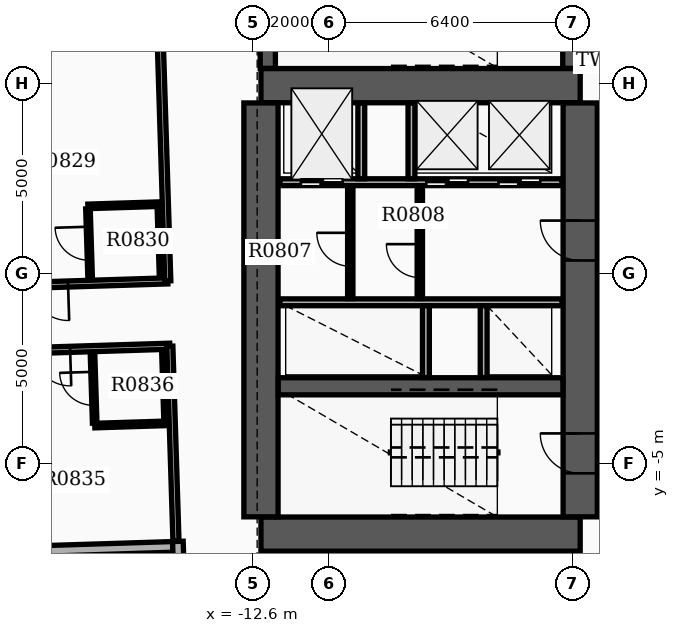
"""IFC4 building model, lengths in metres.
Left out: names, types, materials, properties, quantities, classifications, styles, units other than length and angle.
Written with IfcOpenShell. Run it as: python <this file> out.ifc"""

import sys

from ifc_helpers import new_model, si_unit, direction, frame, frame_2d, origin, place, context, subcontext, project, spatial, rectangle, extrude, element, fill, save


model = new_model("IFC4")
c1 = context("Model", 3, precision=1e-05, world=origin(), true_north=direction((0.0, 1.0)))
c2 = subcontext(c1, "Body", "Model", "MODEL_VIEW")
j1 = project(units=[si_unit("LENGTHUNIT", "METRE"), si_unit("PLANEANGLEUNIT", "RADIAN")], contexts=[c1])
p1 = place(None, origin())
s1 = spatial("IfcSite", under=j1, at=p1, CompositionType="ELEMENT")
p2 = place(p1, origin())
s2 = spatial("IfcBuilding", under=s1, at=p2, CompositionType="ELEMENT")
p3 = place(p2, frame((0.0, 0.0, 56.1)))
s3 = spatial("IfcBuildingStorey", under=s2, at=p3, CompositionType="ELEMENT", Elevation=56.1)
for number, where, z_axis, x_axis in (
    (1, (-12.4, -6.85, 0.0), (0.0, 0.0, 1.0), (1.0, 0.0, 0.0)),
    (2, (-12.4, 4.95, 0.0), (0.0, 0.0, 1.0), (1.0, 0.0, 0.0)),
):
    element("IfcWall", number, at=place(p3, frame(where, z_axis=z_axis, x_axis=x_axis)), inside=s3, PredefinedType="SHEAR", context=c2, shape_type="SweptSolid", body=[
        extrude(rectangle(XDim=8.4, YDim=0.9, at=frame_2d((4.2, 0.0))), origin(), (0.0, 0.0, 1.0), 3.7),
    ])
p4 = place(p3, frame((-12.4, -6.395, 0.0), z_axis=(0.0, 0.0, 1.0), x_axis=(0.0, 1.0, 0.0)))
e3 = element("IfcWall", 3, at=p4, inside=s3, PredefinedType="SHEAR", context=c2, shape_type="SweptSolid", body=[
    extrude(rectangle(XDim=10.89, YDim=0.9, at=frame_2d((5.445, 0.0))), origin(), (0.0, 0.0, 1.0), 3.7),
])
p5 = place(p3, frame((-4.0, -6.395, 0.0), z_axis=(0.0, 0.0, 1.0), x_axis=(0.0, 1.0, 0.0)))
e4 = element("IfcWall", 4, at=p5, inside=s3, PredefinedType="SHEAR", context=c2, shape_type="SweptSolid", body=[
    extrude(rectangle(XDim=10.89, YDim=0.9, at=frame_2d((5.445, 0.0))), origin(), (0.0, 0.0, 1.0), 3.7),
])
p6 = place(p5, frame((1.145, 0.0, 0.0)))
e5 = element("IfcOpeningElement", 5, at=p6, cuts=e4, PredefinedType="OPENING", context=c2, shape_type="SweptSolid", body=[
    extrude(rectangle(XDim=1.05, YDim=2.15, at=frame_2d((0.525, 1.075))), frame((0.0, 0.46, 0.0), z_axis=(0.0, -1.0, 0.0), x_axis=(1.0, 0.0, 0.0)), (0.0, 0.0, 1.0), 0.92),
])
p7 = place(p5, frame((6.745, 0.0, 0.0)))
e6 = element("IfcOpeningElement", 6, at=p7, cuts=e4, PredefinedType="OPENING", context=c2, shape_type="SweptSolid", body=[
    extrude(rectangle(XDim=1.05, YDim=2.15, at=frame_2d((0.525, 1.075))), frame((0.0, 0.46, 0.0), z_axis=(0.0, -1.0, 0.0), x_axis=(1.0, 0.0, 0.0)), (0.0, 0.0, 1.0), 0.92),
])
p8 = place(p3, frame((-11.945, -2.96, 0.0), z_axis=(0.0, 0.0, 1.0), x_axis=(1.0, 0.0, 0.0)))
e7 = element("IfcWall", 7, at=p8, inside=s3, PredefinedType="SHEAR", context=c2, shape_type="SweptSolid", body=[
    extrude(rectangle(XDim=7.49, YDim=0.45, at=frame_2d((3.745, 0.0))), origin(), (0.0, 0.0, 1.0), 3.7),
])
p9 = place(p3, frame((-12.22, 5.405, 0.0), z_axis=(0.0, 0.0, 1.0), x_axis=(0.0, 1.0, 0.0)))
e8 = element("IfcWall", 8, at=p9, inside=s3, PredefinedType="SHEAR", context=c2, shape_type="SweptSolid", body=[
    extrude(rectangle(XDim=3.43, YDim=0.4, at=frame_2d((1.715, 0.0))), origin(), (0.0, 0.0, 1.0), 3.7),
])
p10 = place(p3, frame((-4.26, 5.405, 0.0), z_axis=(0.0, 0.0, 1.0), x_axis=(0.0, 1.0, 0.0)))
e9 = element("IfcWall", 9, at=p10, inside=s3, PredefinedType="SHEAR", context=c2, shape_type="SweptSolid", body=[
    extrude(rectangle(XDim=3.43, YDim=0.4, at=frame_2d((1.715, 0.0))), origin(), (0.0, 0.0, 1.0), 3.7),
])
p11 = place(p10, frame((1.195, 0.0, 0.0)))
e10 = element("IfcOpeningElement", 10, at=p11, cuts=e9, PredefinedType="OPENING", context=c2, shape_type="SweptSolid", body=[
    extrude(rectangle(XDim=1.05, YDim=2.15, at=frame_2d((0.525, 1.075))), frame((0.0, 0.21, 0.0), z_axis=(0.0, -1.0, 0.0), x_axis=(1.0, 0.0, 0.0)), (0.0, 0.0, 1.0), 0.42),
])
p12 = place(p3, frame((-15.144, 6.247, 0.0), z_axis=(0.0, 0.0, 1.0), x_axis=(-0.999506955354, -0.031398187845, 0.0)))
e11 = element("IfcWall", 11, at=p12, inside=s3, PredefinedType="STANDARD", context=c2, shape_type="SweptSolid", body=[
    extrude(rectangle(XDim=20.1, YDim=0.28, at=frame_2d((10.05, 0.0))), origin(), (0.0, 0.0, 1.0), 2.91),
])
p13 = place(p12, frame((0.85, 0.0, 0.8)))
e12 = element("IfcOpeningElement", 12, at=p13, cuts=e11, PredefinedType="OPENING", context=c2, shape_type="SweptSolid", body=[
    extrude(rectangle(XDim=1.4, YDim=1.6, at=frame_2d((0.7, 0.8))), frame((0.0, 0.15, 0.0), z_axis=(0.0, -1.0, 0.0), x_axis=(1.0, 0.0, 0.0)), (0.0, 0.0, 1.0), 0.3),
])
p14 = place(p12, frame((4.05, 0.0, 0.8)))
e13 = element("IfcOpeningElement", 13, at=p14, cuts=e11, PredefinedType="OPENING", context=c2, shape_type="SweptSolid", body=[
    extrude(rectangle(XDim=1.4, YDim=1.6, at=frame_2d((0.7, 0.8))), frame((0.0, 0.15, 0.0), z_axis=(0.0, -1.0, 0.0), x_axis=(1.0, 0.0, 0.0)), (0.0, 0.0, 1.0), 0.3),
])
p15 = place(p12, frame((7.25, 0.0, 0.8)))
e14 = element("IfcOpeningElement", 14, at=p15, cuts=e11, PredefinedType="OPENING", context=c2, shape_type="SweptSolid", body=[
    extrude(rectangle(XDim=1.4, YDim=1.6, at=frame_2d((0.7, 0.8))), frame((0.0, 0.15, 0.0), z_axis=(0.0, -1.0, 0.0), x_axis=(1.0, 0.0, 0.0)), (0.0, 0.0, 1.0), 0.3),
])
p16 = place(p12, frame((10.45, 0.0, 0.8)))
e15 = element("IfcOpeningElement", 15, at=p16, cuts=e11, PredefinedType="OPENING", context=c2, shape_type="SweptSolid", body=[
    extrude(rectangle(XDim=1.4, YDim=1.6, at=frame_2d((0.7, 0.8))), frame((0.0, 0.15, 0.0), z_axis=(0.0, -1.0, 0.0), x_axis=(1.0, 0.0, 0.0)), (0.0, 0.0, 1.0), 0.3),
])
p17 = place(p3, frame((-34.812, -7.817, 0.0), z_axis=(0.0, 0.0, 1.0), x_axis=(0.999506574096, 0.031410322165, 0.0)))
e16 = element("IfcWall", 16, at=p17, inside=s3, PredefinedType="STANDARD", context=c2, shape_type="SweptSolid", body=[
    extrude(rectangle(XDim=20.1, YDim=0.28, at=frame_2d((10.05, 0.0))), origin(), (0.0, 0.0, 1.0), 2.91),
])
p18 = place(p17, frame((0.85, 0.0, 0.8)))
e17 = element("IfcOpeningElement", 17, at=p18, cuts=e16, PredefinedType="OPENING", context=c2, shape_type="SweptSolid", body=[
    extrude(rectangle(XDim=1.4, YDim=1.6, at=frame_2d((0.7, 0.8))), frame((0.0, 0.15, 0.0), z_axis=(0.0, -1.0, 0.0), x_axis=(1.0, 0.0, 0.0)), (0.0, 0.0, 1.0), 0.3),
])
p19 = place(p17, frame((4.05, 0.0, 0.8)))
e18 = element("IfcOpeningElement", 18, at=p19, cuts=e16, PredefinedType="OPENING", context=c2, shape_type="SweptSolid", body=[
    extrude(rectangle(XDim=1.4, YDim=1.6, at=frame_2d((0.7, 0.8))), frame((0.0, 0.15, 0.0), z_axis=(0.0, -1.0, 0.0), x_axis=(1.0, 0.0, 0.0)), (0.0, 0.0, 1.0), 0.3),
])
p20 = place(p17, frame((7.25, 0.0, 0.8)))
e19 = element("IfcOpeningElement", 19, at=p20, cuts=e16, PredefinedType="OPENING", context=c2, shape_type="SweptSolid", body=[
    extrude(rectangle(XDim=1.4, YDim=1.6, at=frame_2d((0.7, 0.8))), frame((0.0, 0.15, 0.0), z_axis=(0.0, -1.0, 0.0), x_axis=(1.0, 0.0, 0.0)), (0.0, 0.0, 1.0), 0.3),
])
p21 = place(p17, frame((10.45, 0.0, 0.8)))
e20 = element("IfcOpeningElement", 20, at=p21, cuts=e16, PredefinedType="OPENING", context=c2, shape_type="SweptSolid", body=[
    extrude(rectangle(XDim=1.4, YDim=1.6, at=frame_2d((0.7, 0.8))), frame((0.0, 0.15, 0.0), z_axis=(0.0, -1.0, 0.0), x_axis=(1.0, 0.0, 0.0)), (0.0, 0.0, 1.0), 0.3),
])
p22 = place(p17, frame((15.0, 0.0, 0.0)))
e21 = element("IfcOpeningElement", 21, at=p22, cuts=e16, PredefinedType="OPENING", context=c2, shape_type="SweptSolid", body=[
    extrude(rectangle(XDim=0.96, YDim=2.1, at=frame_2d((0.48, 1.05))), frame((0.0, 0.15, 0.0), z_axis=(0.0, -1.0, 0.0), x_axis=(1.0, 0.0, 0.0)), (0.0, 0.0, 1.0), 0.3),
])
p23 = place(p3, frame((-14.586, -7.042, 0.0), z_axis=(0.0, 0.0, 1.0), x_axis=(0.031389189386, -0.999507237988, 0.0)))
e22 = element("IfcWall", 22, at=p23, inside=s3, PredefinedType="STANDARD", context=c2, shape_type="SweptSolid", body=[
    extrude(rectangle(XDim=6.86, YDim=0.28, at=frame_2d((3.43, 0.0))), origin(), (0.0, 0.0, 1.0), 2.91),
])
p24 = place(p3, frame((-11.9, 2.41, 0.0), z_axis=(0.0, 0.0, 1.0), x_axis=(1.0, 0.0, 0.0)))
e23 = element("IfcWall", 23, at=p24, inside=s3, PredefinedType="SOLIDWALL", context=c2, shape_type="SweptSolid", body=[
    extrude(rectangle(XDim=7.42, YDim=0.18, at=frame_2d((3.71, 0.0))), origin(), (0.0, 0.0, 1.0), 2.9),
])
p25 = place(p24, frame((0.55, 0.0, 0.0)))
e24 = element("IfcOpeningElement", 24, at=p25, cuts=e23, PredefinedType="OPENING", context=c2, shape_type="SweptSolid", body=[
    extrude(rectangle(XDim=1.1, YDim=2.15, at=frame_2d((0.55, 1.075))), frame((0.0, 0.1, 0.0), z_axis=(0.0, -1.0, 0.0), x_axis=(1.0, 0.0, 0.0)), (0.0, 0.0, 1.0), 0.2),
])
p26 = place(p24, frame((3.85, 0.0, 0.0)))
e25 = element("IfcOpeningElement", 25, at=p26, cuts=e23, PredefinedType="OPENING", context=c2, shape_type="SweptSolid", body=[
    extrude(rectangle(XDim=1.1, YDim=2.15, at=frame_2d((0.55, 1.075))), frame((0.0, 0.1, 0.0), z_axis=(0.0, -1.0, 0.0), x_axis=(1.0, 0.0, 0.0)), (0.0, 0.0, 1.0), 0.2),
])
p27 = place(p24, frame((5.75, 0.0, 0.0)))
e26 = element("IfcOpeningElement", 26, at=p27, cuts=e23, PredefinedType="OPENING", context=c2, shape_type="SweptSolid", body=[
    extrude(rectangle(XDim=1.1, YDim=2.15, at=frame_2d((0.55, 1.075))), frame((0.0, 0.1, 0.0), z_axis=(0.0, -1.0, 0.0), x_axis=(1.0, 0.0, 0.0)), (0.0, 0.0, 1.0), 0.2),
])
p28 = place(p3, frame((-11.9, -0.75, 0.0), z_axis=(0.0, 0.0, 1.0), x_axis=(1.0, 0.0, 0.0)))
e27 = element("IfcWall", 27, at=p28, inside=s3, PredefinedType="SOLIDWALL", context=c2, shape_type="SweptSolid", body=[
    extrude(rectangle(XDim=7.42, YDim=0.18, at=frame_2d((3.71, 0.0))), origin(), (0.0, 0.0, 1.0), 2.9),
])
for number, where, z_axis, x_axis in (
    (28, (-9.76, 2.5, 0.0), (0.0, 0.0, 1.0), (0.0, 1.0, 0.0)),
    (29, (-8.44, 2.5, 0.0), (0.0, 0.0, 1.0), (0.0, 1.0, 0.0)),
):
    element("IfcWall", number, at=place(p3, frame(where, z_axis=z_axis, x_axis=x_axis)), inside=s3, PredefinedType="SOLIDWALL", context=c2, shape_type="SweptSolid", body=[
        extrude(rectangle(XDim=1.99, YDim=0.18, at=frame_2d((0.995, 0.0))), origin(), (0.0, 0.0, 1.0), 2.9),
    ])
for number, where, z_axis, x_axis in (
    (30, (-8.06, -2.73, 0.0), (0.0, 0.0, 1.0), (0.0, 1.0, 0.0)),
    (31, (-6.54, -2.73, 0.0), (0.0, 0.0, 1.0), (0.0, 1.0, 0.0)),
):
    element("IfcWall", number, at=place(p3, frame(where, z_axis=z_axis, x_axis=x_axis)), inside=s3, PredefinedType="SOLIDWALL", context=c2, shape_type="SweptSolid", body=[
        extrude(rectangle(XDim=1.89, YDim=0.18, at=frame_2d((0.945, 0.0))), origin(), (0.0, 0.0, 1.0), 2.9),
    ])
p29 = place(p3, frame((-8.22, -0.65, 0.0), z_axis=(0.0, 0.0, 1.0), x_axis=(0.0, 1.0, 0.0)))
e32 = element("IfcWall", 32, at=p29, inside=s3, PredefinedType="SOLIDWALL", context=c2, shape_type="SweptSolid", body=[
    extrude(rectangle(XDim=2.96, YDim=0.14, at=frame_2d((1.48, 0.0))), origin(), (0.0, 0.0, 1.0), 2.9),
])
p30 = place(p29, frame((0.55, 0.0, 0.0)))
e33 = element("IfcOpeningElement", 33, at=p30, cuts=e32, PredefinedType="OPENING", context=c2, shape_type="SweptSolid", body=[
    extrude(rectangle(XDim=0.88, YDim=2.1, at=frame_2d((0.44, 1.05))), frame((0.0, 0.08, 0.0), z_axis=(0.0, -1.0, 0.0), x_axis=(1.0, 0.0, 0.0)), (0.0, 0.0, 1.0), 0.16),
])
p31 = place(p3, frame((-10.05, -0.652, 0.0), z_axis=(0.0, 0.0, 1.0), x_axis=(0.0, 1.0, 0.0)))
e34 = element("IfcWall", 34, at=p31, inside=s3, PredefinedType="PARTITIONING", context=c2, shape_type="SweptSolid", body=[
    extrude(rectangle(XDim=2.962, YDim=0.14, at=frame_2d((1.481, 0.0))), origin(), (0.0, 0.0, 1.0), 2.9),
])
p32 = place(p31, frame((0.85, 0.0, 0.0)))
e35 = element("IfcOpeningElement", 35, at=p32, cuts=e34, PredefinedType="OPENING", context=c2, shape_type="SweptSolid", body=[
    extrude(rectangle(XDim=0.88, YDim=2.1, at=frame_2d((0.44, 1.05))), frame((0.0, 0.08, 0.0), z_axis=(0.0, -1.0, 0.0), x_axis=(1.0, 0.0, 0.0)), (0.0, 0.0, 1.0), 0.16),
])
p33 = place(p3, frame((-14.852, -0.187, 0.0), z_axis=(0.0, 0.0, 1.0), x_axis=(-0.99950639469, -0.031416030536, 0.0)))
e36 = element("IfcWall", 36, at=p33, inside=s3, PredefinedType="PARTITIONING", context=c2, shape_type="SweptSolid", body=[
    extrude(rectangle(XDim=20.182, YDim=0.16, at=frame_2d((10.091, 0.0))), origin(), (0.0, 0.0, 1.0), 2.9),
])
p34 = place(p33, frame((2.626, 0.0, 0.0)))
e37 = element("IfcOpeningElement", 37, at=p34, cuts=e36, PredefinedType="OPENING", context=c2, shape_type="SweptSolid", body=[
    extrude(rectangle(XDim=0.96, YDim=2.15, at=frame_2d((0.48, 1.075))), frame((0.0, 0.09, 0.0), z_axis=(0.0, -1.0, 0.0), x_axis=(1.0, 0.0, 0.0)), (0.0, 0.0, 1.0), 0.18),
])
p35 = place(p33, frame((9.143, 0.0, 0.0)))
e38 = element("IfcOpeningElement", 38, at=p35, cuts=e36, PredefinedType="OPENING", context=c2, shape_type="SweptSolid", body=[
    extrude(rectangle(XDim=0.96, YDim=2.15, at=frame_2d((0.48, 1.075))), frame((0.0, 0.09, 0.0), z_axis=(0.0, -1.0, 0.0), x_axis=(1.0, 0.0, 0.0)), (0.0, 0.0, 1.0), 0.18),
])
p36 = place(p33, frame((18.93, 0.0, 0.0)))
e39 = element("IfcOpeningElement", 39, at=p36, cuts=e36, PredefinedType="OPENING", context=c2, shape_type="SweptSolid", body=[
    extrude(rectangle(XDim=0.96, YDim=2.15, at=frame_2d((0.48, 1.075))), frame((0.0, 0.09, 0.0), z_axis=(0.0, -1.0, 0.0), x_axis=(1.0, 0.0, 0.0)), (0.0, 0.0, 1.0), 0.18),
])
p37 = place(p3, frame((-14.852, -0.187, 0.0), z_axis=(0.0, 0.0, 1.0), x_axis=(-0.031429784908, 0.999505962274, 0.0)))
e40 = element("IfcWall", 40, at=p37, inside=s3, PredefinedType="PARTITIONING", context=c2, shape_type="SweptSolid", body=[
    extrude(rectangle(XDim=6.292, YDim=0.16, at=frame_2d((3.146, 0.0))), origin(), (0.0, 0.0, 1.0), 2.9),
])
p38 = place(p3, frame((-16.895, -0.111, 0.0), z_axis=(0.0, 0.0, 1.0), x_axis=(-0.031255692016, 0.999511421504, 0.0)))
e41 = element("IfcWall", 41, at=p38, inside=s3, PredefinedType="PARTITIONING", context=c2, shape_type="SweptSolid", body=[
    extrude(rectangle(XDim=1.82, YDim=0.12, at=frame_2d((0.91, 0.0))), origin(), (0.0, 0.0, 1.0), 2.9),
])
p39 = place(p38, frame((0.47, 0.0, 0.0)))
e42 = element("IfcOpeningElement", 42, at=p39, cuts=e41, PredefinedType="OPENING", context=c2, shape_type="SweptSolid", body=[
    extrude(rectangle(XDim=0.88, YDim=2.1, at=frame_2d((0.44, 1.05))), frame((0.0, 0.07, 0.0), z_axis=(0.0, -1.0, 0.0), x_axis=(1.0, 0.0, 0.0)), (0.0, 0.0, 1.0), 0.14),
])
p40 = place(p3, frame((-15.016, -0.052, 0.0), z_axis=(0.0, 0.0, 1.0), x_axis=(-0.031389704724, 0.999507221803, 0.0)))
e43 = element("IfcWall", 43, at=p40, inside=s3, PredefinedType="PARTITIONING", context=c2, shape_type="SweptSolid", body=[
    extrude(rectangle(XDim=1.82, YDim=0.12, at=frame_2d((0.91, 0.0))), origin(), (0.0, 0.0, 1.0), 2.9),
])
p41 = place(p3, frame((-15.075, 1.833, 0.0), z_axis=(0.0, 0.0, 1.0), x_axis=(-0.999502016358, -0.031555020134, 0.0)))
e44 = element("IfcWall", 44, at=p41, inside=s3, PredefinedType="PARTITIONING", context=c2, shape_type="SweptSolid", body=[
    extrude(rectangle(XDim=1.88, YDim=0.12, at=frame_2d((0.94, 0.0))), origin(), (0.0, 0.0, 1.0), 2.9),
])
p42 = place(p3, frame((-14.797, -1.906, 0.0), z_axis=(0.0, 0.0, 1.0), x_axis=(-0.999506406629, -0.031415650687, 0.0)))
e45 = element("IfcWall", 45, at=p42, inside=s3, PredefinedType="PARTITIONING", context=c2, shape_type="SweptSolid", body=[
    extrude(rectangle(XDim=20.182, YDim=0.16, at=frame_2d((10.091, 0.0))), origin(), (0.0, 0.0, 1.0), 2.9),
])
p43 = place(p42, frame((2.626, 0.0, 0.0)))
e46 = element("IfcOpeningElement", 46, at=p43, cuts=e45, PredefinedType="OPENING", context=c2, shape_type="SweptSolid", body=[
    extrude(rectangle(XDim=0.96, YDim=2.15, at=frame_2d((0.48, 1.075))), frame((0.0, 0.09, 0.0), z_axis=(0.0, -1.0, 0.0), x_axis=(1.0, 0.0, 0.0)), (0.0, 0.0, 1.0), 0.18),
])
p44 = place(p42, frame((9.143, 0.0, 0.0)))
e47 = element("IfcOpeningElement", 47, at=p44, cuts=e45, PredefinedType="OPENING", context=c2, shape_type="SweptSolid", body=[
    extrude(rectangle(XDim=0.96, YDim=2.15, at=frame_2d((0.48, 1.075))), frame((0.0, 0.09, 0.0), z_axis=(0.0, -1.0, 0.0), x_axis=(1.0, 0.0, 0.0)), (0.0, 0.0, 1.0), 0.18),
])
p45 = place(p42, frame((18.93, 0.0, 0.0)))
e48 = element("IfcOpeningElement", 48, at=p45, cuts=e45, PredefinedType="OPENING", context=c2, shape_type="SweptSolid", body=[
    extrude(rectangle(XDim=0.96, YDim=2.15, at=frame_2d((0.48, 1.075))), frame((0.0, 0.09, 0.0), z_axis=(0.0, -1.0, 0.0), x_axis=(1.0, 0.0, 0.0)), (0.0, 0.0, 1.0), 0.18),
])
p46 = place(p3, frame((-14.797, -1.906, 0.0), z_axis=(0.0, 0.0, 1.0), x_axis=(0.031398124315, -0.999506957349, 0.0)))
e49 = element("IfcWall", 49, at=p46, inside=s3, PredefinedType="PARTITIONING", context=c2, shape_type="SweptSolid", body=[
    extrude(rectangle(XDim=5.132, YDim=0.16, at=frame_2d((2.566, 0.0))), origin(), (0.0, 0.0, 1.0), 2.9),
])
p47 = place(p3, frame((-16.775, -3.929, 0.0), z_axis=(0.0, 0.0, 1.0), x_axis=(-0.031385496622, 0.999507353951, 0.0)))
e50 = element("IfcWall", 50, at=p47, inside=s3, PredefinedType="PARTITIONING", context=c2, shape_type="SweptSolid", body=[
    extrude(rectangle(XDim=1.82, YDim=0.12, at=frame_2d((0.91, 0.0))), origin(), (0.0, 0.0, 1.0), 2.9),
])
p48 = place(p47, frame((0.47, 0.0, 0.0)))
e51 = element("IfcOpeningElement", 51, at=p48, cuts=e50, PredefinedType="OPENING", context=c2, shape_type="SweptSolid", body=[
    extrude(rectangle(XDim=0.88, YDim=2.1, at=frame_2d((0.44, 1.05))), frame((0.0, 0.07, 0.0), z_axis=(0.0, -1.0, 0.0), x_axis=(1.0, 0.0, 0.0)), (0.0, 0.0, 1.0), 0.14),
])
p49 = place(p3, frame((-14.896, -3.87, 0.0), z_axis=(0.0, 0.0, 1.0), x_axis=(-0.031389704724, 0.999507221803, 0.0)))
e52 = element("IfcWall", 52, at=p49, inside=s3, PredefinedType="PARTITIONING", context=c2, shape_type="SweptSolid", body=[
    extrude(rectangle(XDim=1.82, YDim=0.12, at=frame_2d((0.91, 0.0))), origin(), (0.0, 0.0, 1.0), 2.9),
])
p50 = place(p3, frame((-14.894, -3.935, 0.0), z_axis=(0.0, 0.0, 1.0), x_axis=(-0.999505975261, -0.031429371883, 0.0)))
e53 = element("IfcWall", 53, at=p50, inside=s3, PredefinedType="PARTITIONING", context=c2, shape_type="SweptSolid", body=[
    extrude(rectangle(XDim=1.88, YDim=0.12, at=frame_2d((0.94, 0.0))), origin(), (0.0, 0.0, 1.0), 2.9),
])
p51 = place(p6, origin())
e54 = element("IfcDoor", 54, at=p51, inside=s3, OperationType="SINGLE_SWING_RIGHT", PredefinedType="DOOR", context=c2, shape_type="SweptSolid", body=[
    extrude(rectangle(XDim=1.05, YDim=2.15, at=frame_2d((0.525, 1.075))), frame((0.0, 0.025, 0.0), z_axis=(0.0, -1.0, 0.0), x_axis=(1.0, 0.0, 0.0)), (0.0, 0.0, 1.0), 0.05),
])
fill(e5, e54)
p52 = place(p7, origin())
e55 = element("IfcDoor", 55, at=p52, inside=s3, OperationType="SINGLE_SWING_RIGHT", PredefinedType="DOOR", context=c2, shape_type="SweptSolid", body=[
    extrude(rectangle(XDim=1.05, YDim=2.15, at=frame_2d((0.525, 1.075))), frame((0.0, 0.025, 0.0), z_axis=(0.0, -1.0, 0.0), x_axis=(1.0, 0.0, 0.0)), (0.0, 0.0, 1.0), 0.05),
])
fill(e6, e55)
p53 = place(p25, origin())
e56 = element("IfcDoor", 56, at=p53, inside=s3, OperationType="DOUBLE_DOOR_SLIDING", PredefinedType="DOOR", context=c2, shape_type="SweptSolid", body=[
    extrude(rectangle(XDim=1.1, YDim=2.15, at=frame_2d((0.55, 1.075))), frame((0.0, 0.025, 0.0), z_axis=(0.0, -1.0, 0.0), x_axis=(1.0, 0.0, 0.0)), (0.0, 0.0, 1.0), 0.05),
])
fill(e24, e56)
p54 = place(p26, origin())
e57 = element("IfcDoor", 57, at=p54, inside=s3, OperationType="DOUBLE_DOOR_SLIDING", PredefinedType="DOOR", context=c2, shape_type="SweptSolid", body=[
    extrude(rectangle(XDim=1.1, YDim=2.15, at=frame_2d((0.55, 1.075))), frame((0.0, 0.025, 0.0), z_axis=(0.0, -1.0, 0.0), x_axis=(1.0, 0.0, 0.0)), (0.0, 0.0, 1.0), 0.05),
])
fill(e25, e57)
p55 = place(p27, origin())
e58 = element("IfcDoor", 58, at=p55, inside=s3, OperationType="DOUBLE_DOOR_SLIDING", PredefinedType="DOOR", context=c2, shape_type="SweptSolid", body=[
    extrude(rectangle(XDim=1.1, YDim=2.15, at=frame_2d((0.55, 1.075))), frame((0.0, 0.025, 0.0), z_axis=(0.0, -1.0, 0.0), x_axis=(1.0, 0.0, 0.0)), (0.0, 0.0, 1.0), 0.05),
])
fill(e26, e58)
p56 = place(p30, origin())
e59 = element("IfcDoor", 59, at=p56, inside=s3, OperationType="SINGLE_SWING_RIGHT", PredefinedType="DOOR", context=c2, shape_type="SweptSolid", body=[
    extrude(rectangle(XDim=0.88, YDim=2.1, at=frame_2d((0.44, 1.05))), frame((0.0, 0.025, 0.0), z_axis=(0.0, -1.0, 0.0), x_axis=(1.0, 0.0, 0.0)), (0.0, 0.0, 1.0), 0.05),
])
fill(e33, e59)
p57 = place(p32, origin())
e60 = element("IfcDoor", 60, at=p57, inside=s3, OperationType="SINGLE_SWING_RIGHT", PredefinedType="DOOR", context=c2, shape_type="SweptSolid", body=[
    extrude(rectangle(XDim=0.88, YDim=2.1, at=frame_2d((0.44, 1.05))), frame((0.0, 0.025, 0.0), z_axis=(0.0, -1.0, 0.0), x_axis=(1.0, 0.0, 0.0)), (0.0, 0.0, 1.0), 0.05),
])
fill(e35, e60)
p58 = place(p34, origin())
e61 = element("IfcDoor", 61, at=p58, inside=s3, OperationType="SINGLE_SWING_LEFT", PredefinedType="DOOR", context=c2, shape_type="SweptSolid", body=[
    extrude(rectangle(XDim=0.96, YDim=2.15, at=frame_2d((0.48, 1.075))), frame((0.0, 0.025, 0.0), z_axis=(0.0, -1.0, 0.0), x_axis=(1.0, 0.0, 0.0)), (0.0, 0.0, 1.0), 0.05),
])
fill(e37, e61)
p59 = place(p39, origin())
e62 = element("IfcDoor", 62, at=p59, inside=s3, OperationType="SINGLE_SWING_RIGHT", PredefinedType="DOOR", context=c2, shape_type="SweptSolid", body=[
    extrude(rectangle(XDim=0.88, YDim=2.1, at=frame_2d((0.44, 1.05))), frame((0.0, 0.025, 0.0), z_axis=(0.0, -1.0, 0.0), x_axis=(1.0, 0.0, 0.0)), (0.0, 0.0, 1.0), 0.05),
])
fill(e42, e62)
p60 = place(p43, origin())
e63 = element("IfcDoor", 63, at=p60, inside=s3, OperationType="SINGLE_SWING_LEFT", PredefinedType="DOOR", context=c2, shape_type="SweptSolid", body=[
    extrude(rectangle(XDim=0.96, YDim=2.15, at=frame_2d((0.48, 1.075))), frame((0.0, 0.025, 0.0), z_axis=(0.0, -1.0, 0.0), x_axis=(1.0, 0.0, 0.0)), (0.0, 0.0, 1.0), 0.05),
])
fill(e46, e63)
p61 = place(p48, origin())
e64 = element("IfcDoor", 64, at=p61, inside=s3, OperationType="SINGLE_SWING_RIGHT", PredefinedType="DOOR", context=c2, shape_type="SweptSolid", body=[
    extrude(rectangle(XDim=0.88, YDim=2.1, at=frame_2d((0.44, 1.05))), frame((0.0, 0.025, 0.0), z_axis=(0.0, -1.0, 0.0), x_axis=(1.0, 0.0, 0.0)), (0.0, 0.0, 1.0), 0.05),
])
fill(e51, e64)
save(model, sys.argv[1])
